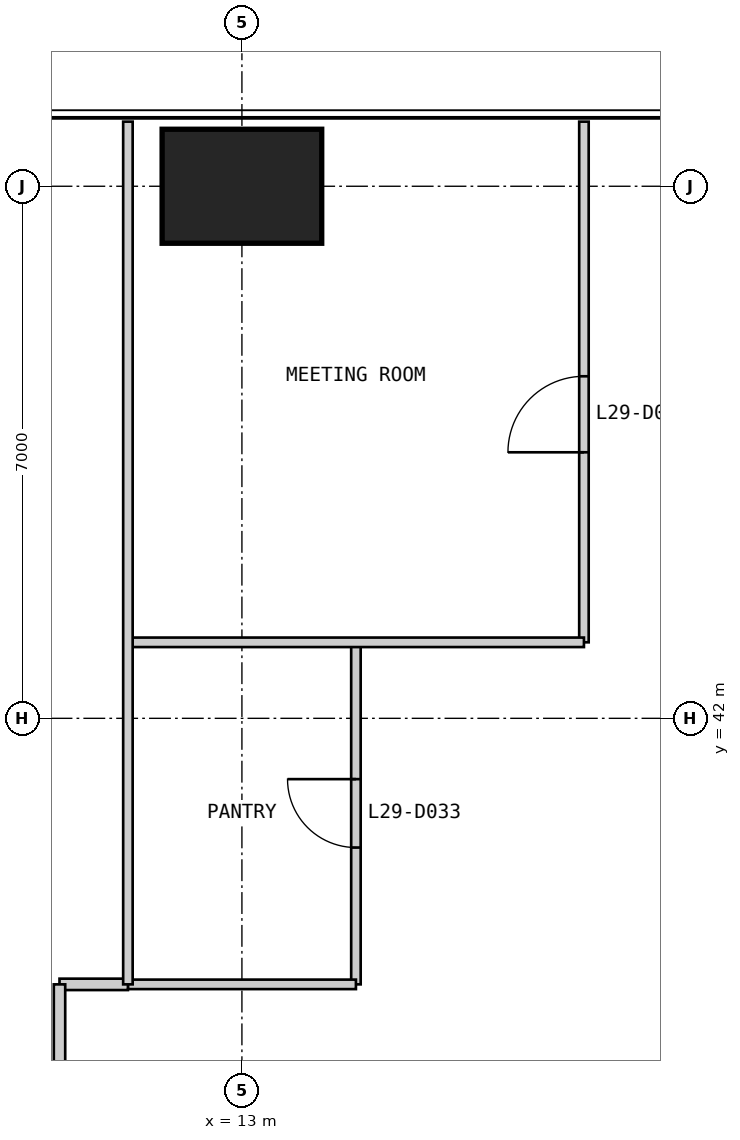
"""IFC4 building model, lengths in metres.
Left out: names, types, materials, properties, quantities, classifications, styles, units other than length and angle.
Written with IfcOpenShell. Run it as: python <this file> out.ifc"""

import sys

from ifc_helpers import new_model, si_unit, direction, frame, frame_2d, origin, origin_2d, place, context, subcontext, project, spatial, rectangle, extrude, element, fill, save


model = new_model("IFC4")
c1 = context("Model", 3, precision=1e-05, world=origin(), true_north=direction((0.0, 1.0)))
c2 = subcontext(c1, "Body", "Model", "MODEL_VIEW")
j1 = project(units=[si_unit("LENGTHUNIT", "METRE"), si_unit("PLANEANGLEUNIT", "RADIAN")], contexts=[c1])
p1 = place(None, origin())
s1 = spatial("IfcSite", under=j1, at=p1, CompositionType="ELEMENT")
p2 = place(p1, origin())
s2 = spatial("IfcBuilding", under=s1, at=p2, CompositionType="ELEMENT")
p3 = place(p2, frame((0.0, 0.0, 126.4)))
s3 = spatial("IfcBuildingStorey", under=s2, at=p3, CompositionType="ELEMENT", Elevation=126.4)
p4 = place(p3, frame((13.0, 49.0, 0.0), z_axis=(0.0, 0.0, 1.0), x_axis=(1.0, 0.0, 0.0)))
e1 = element("IfcColumn", 1, at=p4, inside=s3, PredefinedType="COLUMN", context=c2, shape_type="SweptSolid", body=[
    extrude(rectangle(XDim=2.1, YDim=1.5, at=origin_2d()), origin(), (0.0, 0.0, 1.0), 4.0),
])
p5 = place(p3, frame((17.5, 49.85, 0.0), z_axis=(0.0, 0.0, 1.0), x_axis=(0.0, -1.0, 0.0)))
e2 = element("IfcWall", 2, at=p5, inside=s3, PredefinedType="PARTITIONING", context=c2, shape_type="SweptSolid", body=[
    extrude(rectangle(XDim=6.85, YDim=0.125, at=frame_2d((3.425, 0.0))), origin(), (0.0, 0.0, 1.0), 3.85),
])
p6 = place(p5, frame((3.35, 0.0, 0.0)))
e3 = element("IfcOpeningElement", 3, at=p6, cuts=e2, PredefinedType="OPENING", context=c2, shape_type="SweptSolid", body=[
    extrude(rectangle(XDim=1.0, YDim=2.2, at=frame_2d((0.5, 1.1))), frame((0.0, 0.073, 0.0), z_axis=(0.0, -1.0, 0.0), x_axis=(1.0, 0.0, 0.0)), (0.0, 0.0, 1.0), 0.145),
])
p7 = place(p3, frame((14.5, 43.0, 0.0), z_axis=(0.0, 0.0, 1.0), x_axis=(0.0, -1.0, 0.0)))
e4 = element("IfcWall", 4, at=p7, inside=s3, PredefinedType="PARTITIONING", context=c2, shape_type="SweptSolid", body=[
    extrude(rectangle(XDim=4.5, YDim=0.125, at=frame_2d((2.25, 0.0))), origin(), (0.0, 0.0, 1.0), 3.85),
])
p8 = place(p7, frame((1.8, 0.0, 0.0)))
e5 = element("IfcOpeningElement", 5, at=p8, cuts=e4, PredefinedType="OPENING", context=c2, shape_type="SweptSolid", body=[
    extrude(rectangle(XDim=0.9, YDim=2.2, at=frame_2d((0.45, 1.1))), frame((0.0, 0.073, 0.0), z_axis=(0.0, -1.0, 0.0), x_axis=(1.0, 0.0, 0.0)), (0.0, 0.0, 1.0), 0.145),
])
p9 = place(p3, frame((17.5, 43.0, 0.0), z_axis=(0.0, 0.0, 1.0), x_axis=(-1.0, 0.0, 0.0)))
e6 = element("IfcWall", 6, at=p9, inside=s3, PredefinedType="PARTITIONING", context=c2, shape_type="SweptSolid", body=[
    extrude(rectangle(XDim=6.0, YDim=0.125, at=frame_2d((3.0, 0.0))), origin(), (0.0, 0.0, 1.0), 3.85),
])
p10 = place(p3, frame((14.5, 38.5, 0.0), z_axis=(0.0, 0.0, 1.0), x_axis=(-1.0, 0.0, 0.0)))
e7 = element("IfcWall", 7, at=p10, inside=s3, PredefinedType="PARTITIONING", context=c2, shape_type="SweptSolid", body=[
    extrude(rectangle(XDim=3.0, YDim=0.125, at=frame_2d((1.5, 0.0))), origin(), (0.0, 0.0, 1.0), 3.85),
])
p11 = place(p3, frame((11.5, 38.5, 0.0), z_axis=(0.0, 0.0, 1.0), x_axis=(-1.0, 0.0, 0.0)))
e8 = element("IfcWall", 8, at=p11, inside=s3, PredefinedType="PARTITIONING", context=c2, shape_type="SweptSolid", body=[
    extrude(rectangle(XDim=0.9, YDim=0.15, at=frame_2d((0.45, 0.0))), origin(), (0.0, 0.0, 1.0), 3.85),
])
p12 = place(p3, frame((10.6, 38.5, 0.0), z_axis=(0.0, 0.0, 1.0), x_axis=(0.0, -1.0, 0.0)))
e9 = element("IfcWall", 9, at=p12, inside=s3, PredefinedType="PARTITIONING", context=c2, shape_type="SweptSolid", body=[
    extrude(rectangle(XDim=27.9, YDim=0.15, at=frame_2d((13.95, 0.0))), origin(), (0.0, 0.0, 1.0), 3.85),
])
p13 = place(p12, frame((1.75, 0.0, 0.0)))
e10 = element("IfcOpeningElement", 10, at=p13, cuts=e9, PredefinedType="OPENING", context=c2, shape_type="SweptSolid", body=[
    extrude(rectangle(XDim=1.0, YDim=2.2, at=frame_2d((0.5, 1.1))), frame((0.0, 0.085, 0.0), z_axis=(0.0, -1.0, 0.0), x_axis=(1.0, 0.0, 0.0)), (0.0, 0.0, 1.0), 0.17),
])
p14 = place(p12, frame((22.75, 0.0, 0.0)))
e11 = element("IfcOpeningElement", 11, at=p14, cuts=e9, PredefinedType="OPENING", context=c2, shape_type="SweptSolid", body=[
    extrude(rectangle(XDim=1.0, YDim=2.2, at=frame_2d((0.5, 1.1))), frame((0.0, 0.085, 0.0), z_axis=(0.0, -1.0, 0.0), x_axis=(1.0, 0.0, 0.0)), (0.0, 0.0, 1.0), 0.17),
])
p15 = place(p3, frame((11.5, 49.85, 0.0), z_axis=(0.0, 0.0, 1.0), x_axis=(0.0, -1.0, 0.0)))
e12 = element("IfcWall", 12, at=p15, inside=s3, PredefinedType="PARTITIONING", context=c2, shape_type="SweptSolid", body=[
    extrude(rectangle(XDim=11.35, YDim=0.125, at=frame_2d((5.675, 0.0))), origin(), (0.0, 0.0, 1.0), 3.85),
])
p16 = place(p6, frame((1.0, 0.0, 0.0), z_axis=(0.0, 0.0, 1.0), x_axis=(-1.0, 0.0, 0.0)))
e13 = element("IfcDoor", 13, at=p16, inside=s3, OperationType="SINGLE_SWING_LEFT", PredefinedType="DOOR", context=c2, shape_type="SweptSolid", body=[
    extrude(rectangle(XDim=1.0, YDim=2.2, at=frame_2d((0.5, 1.1))), frame((0.0, 0.025, 0.0), z_axis=(0.0, -1.0, 0.0), x_axis=(1.0, 0.0, 0.0)), (0.0, 0.0, 1.0), 0.05),
])
fill(e3, e13)
p17 = place(p8, frame((0.9, 0.0, 0.0), z_axis=(0.0, 0.0, 1.0), x_axis=(-1.0, 0.0, 0.0)))
e14 = element("IfcDoor", 14, at=p17, inside=s3, OperationType="SINGLE_SWING_RIGHT", PredefinedType="DOOR", context=c2, shape_type="SweptSolid", body=[
    extrude(rectangle(XDim=0.9, YDim=2.2, at=frame_2d((0.45, 1.1))), frame((0.0, 0.025, 0.0), z_axis=(0.0, -1.0, 0.0), x_axis=(1.0, 0.0, 0.0)), (0.0, 0.0, 1.0), 0.05),
])
fill(e5, e14)
save(model, sys.argv[1])
